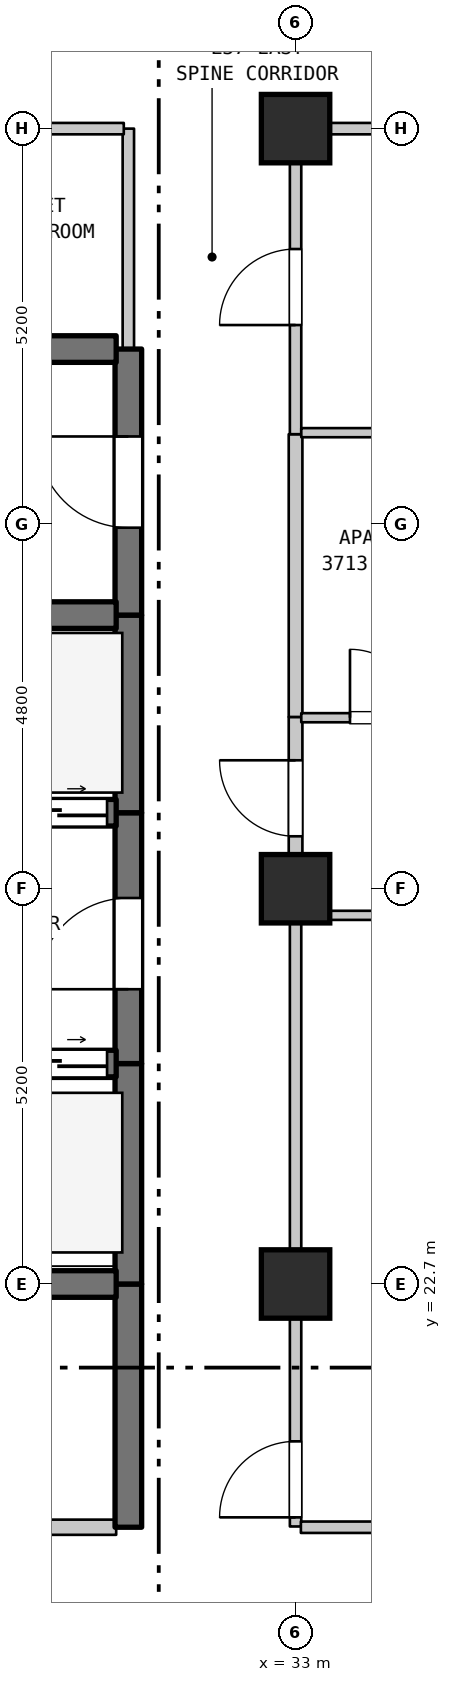
"""IFC4 building model, lengths in metres.
Left out: names, types, materials, properties, quantities, classifications, styles, units other than length and angle.
Written with IfcOpenShell. Run it as: python <this file> out.ifc"""

import sys

from ifc_helpers import new_model, si_unit, direction, frame, frame_2d, origin, origin_2d, place, context, subcontext, project, spatial, rectangle, extrude, element, fill, save


model = new_model("IFC4")
c1 = context("Model", 3, precision=1e-05, world=origin(), true_north=direction((0.0, 1.0)))
c2 = subcontext(c1, "Body", "Model", "MODEL_VIEW")
j1 = project(units=[si_unit("LENGTHUNIT", "METRE"), si_unit("PLANEANGLEUNIT", "RADIAN")], contexts=[c1])
p1 = place(None, origin())
s1 = spatial("IfcSite", under=j1, at=p1, CompositionType="ELEMENT")
p2 = place(p1, origin())
s2 = spatial("IfcBuilding", under=s1, at=p2, CompositionType="ELEMENT")
p3 = place(p2, frame((0.0, 0.0, 152.0)))
s3 = spatial("IfcBuildingStorey", under=s2, at=p3, CompositionType="ELEMENT", Elevation=152.0)
for number, where, z_axis, x_axis in (
    (1, (33.0, 22.7, 0.0), (0.0, 0.0, 1.0), (1.0, 0.0, 0.0)),
    (2, (33.0, 27.9, 0.0), (0.0, 0.0, 1.0), (1.0, 0.0, 0.0)),
    (3, (33.0, 37.9, 0.0), (0.0, 0.0, 1.0), (1.0, 0.0, 0.0)),
):
    element("IfcColumn", number, at=place(p3, frame(where, z_axis=z_axis, x_axis=x_axis)), inside=s3, PredefinedType="COLUMN", context=c2, shape_type="SweptSolid", body=[
        extrude(rectangle(XDim=0.9, YDim=0.9, at=origin_2d()), origin(), (0.0, 0.0, 1.0), 3.7),
    ])
p4 = place(p3, frame((30.8, 19.5, 0.0), z_axis=(0.0, 0.0, 1.0), x_axis=(0.0, 1.0, 0.0)))
e4 = element("IfcWall", 4, at=p4, inside=s3, PredefinedType="SHEAR", context=c2, shape_type="SweptSolid", body=[
    extrude(rectangle(XDim=3.2, YDim=0.35, at=frame_2d((1.6, 0.0))), origin(), (0.0, 0.0, 1.0), 3.385),
])
p5 = place(p3, frame((30.8, 22.7, 0.0), z_axis=(0.0, 0.0, 1.0), x_axis=(0.0, 1.0, 0.0)))
e5 = element("IfcWall", 5, at=p5, inside=s3, PredefinedType="SHEAR", context=c2, shape_type="SweptSolid", body=[
    extrude(rectangle(XDim=2.9, YDim=0.35, at=frame_2d((1.45, 0.0))), origin(), (0.0, 0.0, 1.0), 3.385),
])
p6 = place(p3, frame((30.8, 25.6, 0.0), z_axis=(0.0, 0.0, 1.0), x_axis=(0.0, 1.0, 0.0)))
e6 = element("IfcWall", 6, at=p6, inside=s3, PredefinedType="SHEAR", context=c2, shape_type="SweptSolid", body=[
    extrude(rectangle(XDim=3.3, YDim=0.35, at=frame_2d((1.65, 0.0))), origin(), (0.0, 0.0, 1.0), 3.385),
])
p7 = place(p6, frame((0.978, 0.0, 0.0)))
e7 = element("IfcOpeningElement", 7, at=p7, cuts=e6, PredefinedType="OPENING", context=c2, shape_type="SweptSolid", body=[
    extrude(rectangle(XDim=1.2, YDim=2.2, at=frame_2d((0.6, 1.1))), frame((0.0, 0.185, 0.0), z_axis=(0.0, -1.0, 0.0), x_axis=(1.0, 0.0, 0.0)), (0.0, 0.0, 1.0), 0.37),
])
p8 = place(p3, frame((30.8, 28.9, 0.0), z_axis=(0.0, 0.0, 1.0), x_axis=(0.0, 1.0, 0.0)))
e8 = element("IfcWall", 8, at=p8, inside=s3, PredefinedType="SHEAR", context=c2, shape_type="SweptSolid", body=[
    extrude(rectangle(XDim=2.6, YDim=0.35, at=frame_2d((1.3, 0.0))), origin(), (0.0, 0.0, 1.0), 3.385),
])
p9 = place(p3, frame((30.8, 31.5, 0.0), z_axis=(0.0, 0.0, 1.0), x_axis=(0.0, 1.0, 0.0)))
e9 = element("IfcWall", 9, at=p9, inside=s3, PredefinedType="SHEAR", context=c2, shape_type="SweptSolid", body=[
    extrude(rectangle(XDim=3.5, YDim=0.35, at=frame_2d((1.75, 0.0))), origin(), (0.0, 0.0, 1.0), 3.385),
])
p10 = place(p9, frame((1.15, 0.0, 0.0)))
e10 = element("IfcOpeningElement", 10, at=p10, cuts=e9, PredefinedType="OPENING", context=c2, shape_type="SweptSolid", body=[
    extrude(rectangle(XDim=1.2, YDim=2.2, at=frame_2d((0.6, 1.1))), frame((0.0, 0.185, 0.0), z_axis=(0.0, -1.0, 0.0), x_axis=(1.0, 0.0, 0.0)), (0.0, 0.0, 1.0), 0.37),
])
p11 = place(p3, frame((30.8, 35.0, 0.0), z_axis=(0.0, 0.0, 1.0), x_axis=(0.0, 1.0, 0.0)))
e11 = element("IfcWall", 11, at=p11, inside=s3, PredefinedType="STANDARD", context=c2, shape_type="SweptSolid", body=[
    extrude(rectangle(XDim=2.9, YDim=0.15, at=frame_2d((1.45, 0.0))), origin(), (0.0, 0.0, 1.0), 3.385),
])
p12 = place(p3, frame((33.0, 19.51, 0.0), z_axis=(0.0, 0.0, 1.0), x_axis=(0.0, 1.0, 0.0)))
e12 = element("IfcWall", 12, at=p12, inside=s3, PredefinedType="STANDARD", context=c2, shape_type="SweptSolid", body=[
    extrude(rectangle(XDim=8.04, YDim=0.15, at=frame_2d((4.02, 0.0))), origin(), (0.0, 0.0, 1.0), 2.935),
])
p13 = place(p12, frame((0.12, 0.0, 0.0)))
e13 = element("IfcOpeningElement", 13, at=p13, cuts=e12, PredefinedType="OPENING", context=c2, shape_type="SweptSolid", body=[
    extrude(rectangle(XDim=1.0, YDim=2.15, at=frame_2d((0.5, 1.075))), frame((0.0, 0.085, 0.0), z_axis=(0.0, -1.0, 0.0), x_axis=(1.0, 0.0, 0.0)), (0.0, 0.0, 1.0), 0.17),
])
p14 = place(p3, frame((33.0, 27.56, 0.0), z_axis=(0.0, 0.0, 1.0), x_axis=(0.0, 1.0, 0.0)))
e14 = element("IfcWall", 14, at=p14, inside=s3, PredefinedType="STANDARD", context=c2, shape_type="SweptSolid", body=[
    extrude(rectangle(XDim=2.6, YDim=0.18, at=frame_2d((1.3, 0.0))), origin(), (0.0, 0.0, 1.0), 2.885),
])
p15 = place(p14, frame((1.03, 0.0, 0.0)))
e15 = element("IfcOpeningElement", 15, at=p15, cuts=e14, PredefinedType="OPENING", context=c2, shape_type="SweptSolid", body=[
    extrude(rectangle(XDim=1.0, YDim=2.15, at=frame_2d((0.5, 1.075))), frame((0.0, 0.1, 0.0), z_axis=(0.0, -1.0, 0.0), x_axis=(1.0, 0.0, 0.0)), (0.0, 0.0, 1.0), 0.2),
])
p16 = place(p3, frame((33.0, 30.16, 0.0), z_axis=(0.0, 0.0, 1.0), x_axis=(0.0, 1.0, 0.0)))
e16 = element("IfcWall", 16, at=p16, inside=s3, PredefinedType="STANDARD", context=c2, shape_type="SweptSolid", body=[
    extrude(rectangle(XDim=3.72, YDim=0.18, at=frame_2d((1.86, 0.0))), origin(), (0.0, 0.0, 1.0), 2.885),
])
p17 = place(p3, frame((33.0, 33.88, 0.0), z_axis=(0.0, 0.0, 1.0), x_axis=(0.0, 1.0, 0.0)))
e17 = element("IfcWall", 17, at=p17, inside=s3, PredefinedType="STANDARD", context=c2, shape_type="SweptSolid", body=[
    extrude(rectangle(XDim=4.02, YDim=0.15, at=frame_2d((2.01, 0.0))), origin(), (0.0, 0.0, 1.0), 2.885),
])
p18 = place(p17, frame((1.436, 0.0, 0.0)))
e18 = element("IfcOpeningElement", 18, at=p18, cuts=e17, PredefinedType="OPENING", context=c2, shape_type="SweptSolid", body=[
    extrude(rectangle(XDim=1.0, YDim=2.15, at=frame_2d((0.5, 1.075))), frame((0.0, 0.085, 0.0), z_axis=(0.0, -1.0, 0.0), x_axis=(1.0, 0.0, 0.0)), (0.0, 0.0, 1.0), 0.17),
])
p19 = place(p3, frame((25.985, 19.5, 0.0), z_axis=(0.0, 0.0, 1.0), x_axis=(1.0, 0.0, 0.0)))
e19 = element("IfcWall", 19, at=p19, inside=s3, PredefinedType="STANDARD", context=c2, shape_type="SweptSolid", body=[
    extrude(rectangle(XDim=4.655, YDim=0.2, at=frame_2d((2.327, 0.0))), origin(), (0.0, 0.0, 1.0), 3.385),
])
p20 = place(p19, frame((1.845, 0.0, 0.0)))
e20 = element("IfcOpeningElement", 20, at=p20, cuts=e19, PredefinedType="OPENING", context=c2, shape_type="SweptSolid", body=[
    extrude(rectangle(XDim=0.9, YDim=2.15, at=frame_2d((0.45, 1.075))), frame((0.0, 0.11, 0.0), z_axis=(0.0, -1.0, 0.0), x_axis=(1.0, 0.0, 0.0)), (0.0, 0.0, 1.0), 0.22),
])
p21 = place(p3, frame((33.07, 19.5, 0.0), z_axis=(0.0, 0.0, 1.0), x_axis=(1.0, 0.0, 0.0)))
e21 = element("IfcWall", 21, at=p21, inside=s3, PredefinedType="STANDARD", context=c2, shape_type="SweptSolid", body=[
    extrude(rectangle(XDim=21.51, YDim=0.15, at=frame_2d((10.755, 0.0))), origin(), (0.0, 0.0, 1.0), 3.385),
])
p22 = place(p21, frame((10.185, 0.0, 0.0)))
e22 = element("IfcOpeningElement", 22, at=p22, cuts=e21, PredefinedType="OPENING", context=c2, shape_type="SweptSolid", body=[
    extrude(rectangle(XDim=1.0, YDim=2.15, at=frame_2d((0.5, 1.075))), frame((0.0, 0.085, 0.0), z_axis=(0.0, -1.0, 0.0), x_axis=(1.0, 0.0, 0.0)), (0.0, 0.0, 1.0), 0.17),
])
p23 = place(p3, frame((27.46, 22.7, 0.0), z_axis=(0.0, 0.0, 1.0), x_axis=(1.0, 0.0, 0.0)))
e23 = element("IfcWall", 23, at=p23, inside=s3, PredefinedType="SHEAR", context=c2, shape_type="SweptSolid", body=[
    extrude(rectangle(XDim=3.18, YDim=0.35, at=frame_2d((1.59, 0.0))), origin(), (0.0, 0.0, 1.0), 3.385),
])
p24 = place(p3, frame((27.46, 25.6, 0.0), z_axis=(0.0, 0.0, 1.0), x_axis=(1.0, 0.0, 0.0)))
e24 = element("IfcWall", 24, at=p24, inside=s3, PredefinedType="SHEAR", context=c2, shape_type="SweptSolid", body=[
    extrude(rectangle(XDim=3.18, YDim=0.35, at=frame_2d((1.59, 0.0))), origin(), (0.0, 0.0, 1.0), 3.385),
])
p25 = place(p24, frame((0.12, 0.0, 0.0)))
e25 = element("IfcOpeningElement", 25, at=p25, cuts=e24, PredefinedType="OPENING", context=c2, shape_type="SweptSolid", body=[
    extrude(rectangle(XDim=1.25, YDim=2.2, at=frame_2d((0.625, 1.1))), frame((0.0, 0.185, 0.0), z_axis=(0.0, -1.0, 0.0), x_axis=(1.0, 0.0, 0.0)), (0.0, 0.0, 1.0), 0.37),
])
p26 = place(p24, frame((1.81, 0.0, 0.0)))
e26 = element("IfcOpeningElement", 26, at=p26, cuts=e24, PredefinedType="OPENING", context=c2, shape_type="SweptSolid", body=[
    extrude(rectangle(XDim=1.25, YDim=2.2, at=frame_2d((0.625, 1.1))), frame((0.0, 0.185, 0.0), z_axis=(0.0, -1.0, 0.0), x_axis=(1.0, 0.0, 0.0)), (0.0, 0.0, 1.0), 0.37),
])
p27 = place(p3, frame((33.085, 27.55, 0.0), z_axis=(0.0, 0.0, 1.0), x_axis=(1.0, 0.0, 0.0)))
e27 = element("IfcWall", 27, at=p27, inside=s3, PredefinedType="PARTITIONING", context=c2, shape_type="SweptSolid", body=[
    extrude(rectangle(XDim=23.905, YDim=0.12, at=frame_2d((11.953, 0.0))), origin(), (0.0, 0.0, 1.0), 3.385),
])
p28 = place(p3, frame((27.46, 28.9, 0.0), z_axis=(0.0, 0.0, 1.0), x_axis=(1.0, 0.0, 0.0)))
e28 = element("IfcWall", 28, at=p28, inside=s3, PredefinedType="SHEAR", context=c2, shape_type="SweptSolid", body=[
    extrude(rectangle(XDim=3.18, YDim=0.35, at=frame_2d((1.59, 0.0))), origin(), (0.0, 0.0, 1.0), 3.385),
])
p29 = place(p28, frame((0.12, 0.0, 0.0)))
e29 = element("IfcOpeningElement", 29, at=p29, cuts=e28, PredefinedType="OPENING", context=c2, shape_type="SweptSolid", body=[
    extrude(rectangle(XDim=1.25, YDim=2.2, at=frame_2d((0.625, 1.1))), frame((0.0, 0.185, 0.0), z_axis=(0.0, -1.0, 0.0), x_axis=(1.0, 0.0, 0.0)), (0.0, 0.0, 1.0), 0.37),
])
p30 = place(p28, frame((1.81, 0.0, 0.0)))
e30 = element("IfcOpeningElement", 30, at=p30, cuts=e28, PredefinedType="OPENING", context=c2, shape_type="SweptSolid", body=[
    extrude(rectangle(XDim=1.25, YDim=2.2, at=frame_2d((0.625, 1.1))), frame((0.0, 0.185, 0.0), z_axis=(0.0, -1.0, 0.0), x_axis=(1.0, 0.0, 0.0)), (0.0, 0.0, 1.0), 0.37),
])
p31 = place(p3, frame((33.075, 30.15, 0.0), z_axis=(0.0, 0.0, 1.0), x_axis=(1.0, 0.0, 0.0)))
e31 = element("IfcWall", 31, at=p31, inside=s3, PredefinedType="PARTITIONING", context=c2, shape_type="SweptSolid", body=[
    extrude(rectangle(XDim=2.364, YDim=0.12, at=frame_2d((1.182, 0.0))), origin(), (0.0, 0.0, 1.0), 3.385),
])
p32 = place(p31, frame((0.641, 0.0, 0.0)))
e32 = element("IfcOpeningElement", 32, at=p32, cuts=e31, PredefinedType="OPENING", context=c2, shape_type="SweptSolid", body=[
    extrude(rectangle(XDim=0.9, YDim=2.15, at=frame_2d((0.45, 1.075))), frame((0.0, 0.07, 0.0), z_axis=(0.0, -1.0, 0.0), x_axis=(1.0, 0.0, 0.0)), (0.0, 0.0, 1.0), 0.14),
])
p33 = place(p3, frame((27.46, 31.5, 0.0), z_axis=(0.0, 0.0, 1.0), x_axis=(1.0, 0.0, 0.0)))
e33 = element("IfcWall", 33, at=p33, inside=s3, PredefinedType="SHEAR", context=c2, shape_type="SweptSolid", body=[
    extrude(rectangle(XDim=3.18, YDim=0.35, at=frame_2d((1.59, 0.0))), origin(), (0.0, 0.0, 1.0), 3.385),
])
p34 = place(p3, frame((33.075, 33.9, 0.0), z_axis=(0.0, 0.0, 1.0), x_axis=(1.0, 0.0, 0.0)))
e34 = element("IfcWall", 34, at=p34, inside=s3, PredefinedType="PARTITIONING", context=c2, shape_type="SweptSolid", body=[
    extrude(rectangle(XDim=2.364, YDim=0.12, at=frame_2d((1.182, 0.0))), origin(), (0.0, 0.0, 1.0), 3.385),
])
p35 = place(p3, frame((26.645, 35.0, 0.0), z_axis=(0.0, 0.0, 1.0), x_axis=(1.0, 0.0, 0.0)))
e35 = element("IfcWall", 35, at=p35, inside=s3, PredefinedType="SHEAR", context=c2, shape_type="SweptSolid", body=[
    extrude(rectangle(XDim=3.995, YDim=0.35, at=frame_2d((1.998, 0.0))), origin(), (0.0, 0.0, 1.0), 3.385),
])
p36 = place(p35, frame((1.508, 0.0, 0.0)))
e36 = element("IfcOpeningElement", 36, at=p36, cuts=e35, PredefinedType="OPENING", context=c2, shape_type="SweptSolid", body=[
    extrude(rectangle(XDim=0.95, YDim=2.15, at=frame_2d((0.475, 1.075))), frame((0.0, 0.185, 0.0), z_axis=(0.0, -1.0, 0.0), x_axis=(1.0, 0.0, 0.0)), (0.0, 0.0, 1.0), 0.37),
])
p37 = place(p3, frame((26.645, 37.9, 0.0), z_axis=(0.0, 0.0, 1.0), x_axis=(1.0, 0.0, 0.0)))
e37 = element("IfcWall", 37, at=p37, inside=s3, PredefinedType="STANDARD", context=c2, shape_type="SweptSolid", body=[
    extrude(rectangle(XDim=4.095, YDim=0.15, at=frame_2d((2.047, 0.0))), origin(), (0.0, 0.0, 1.0), 2.885),
])
p38 = place(p3, frame((33.06, 37.9, 0.0), z_axis=(0.0, 0.0, 1.0), x_axis=(1.0, 0.0, 0.0)))
e38 = element("IfcWall", 38, at=p38, inside=s3, PredefinedType="STANDARD", context=c2, shape_type="SweptSolid", body=[
    extrude(rectangle(XDim=11.879, YDim=0.15, at=frame_2d((5.939, 0.0))), origin(), (0.0, 0.0, 1.0), 3.385),
])
p39 = place(p38, frame((5.439, 0.0, 0.0)))
e39 = element("IfcOpeningElement", 39, at=p39, cuts=e38, PredefinedType="OPENING", context=c2, shape_type="SweptSolid", body=[
    extrude(rectangle(XDim=1.0, YDim=2.15, at=frame_2d((0.5, 1.075))), frame((0.0, 0.085, 0.0), z_axis=(0.0, -1.0, 0.0), x_axis=(1.0, 0.0, 0.0)), (0.0, 0.0, 1.0), 0.17),
])
p40 = place(p7, origin())
e40 = element("IfcDoor", 40, at=p40, inside=s3, OperationType="SINGLE_SWING_LEFT", PredefinedType="DOOR", context=c2, shape_type="SweptSolid", body=[
    extrude(rectangle(XDim=1.2, YDim=2.2, at=frame_2d((0.6, 1.1))), frame((0.0, 0.025, 0.0), z_axis=(0.0, -1.0, 0.0), x_axis=(1.0, 0.0, 0.0)), (0.0, 0.0, 1.0), 0.05),
])
fill(e7, e40)
p41 = place(p10, origin())
e41 = element("IfcDoor", 41, at=p41, inside=s3, OperationType="SINGLE_SWING_RIGHT", PredefinedType="DOOR", context=c2, shape_type="SweptSolid", body=[
    extrude(rectangle(XDim=1.2, YDim=2.2, at=frame_2d((0.6, 1.1))), frame((0.0, 0.025, 0.0), z_axis=(0.0, -1.0, 0.0), x_axis=(1.0, 0.0, 0.0)), (0.0, 0.0, 1.0), 0.05),
])
fill(e10, e41)
p42 = place(p13, origin())
e42 = element("IfcDoor", 42, at=p42, inside=s3, OperationType="SINGLE_SWING_LEFT", PredefinedType="DOOR", context=c2, shape_type="SweptSolid", body=[
    extrude(rectangle(XDim=1.0, YDim=2.15, at=frame_2d((0.5, 1.075))), frame((0.0, 0.025, 0.0), z_axis=(0.0, -1.0, 0.0), x_axis=(1.0, 0.0, 0.0)), (0.0, 0.0, 1.0), 0.05),
])
fill(e13, e42)
p43 = place(p15, origin())
e43 = element("IfcDoor", 43, at=p43, inside=s3, OperationType="SINGLE_SWING_RIGHT", PredefinedType="DOOR", context=c2, shape_type="SweptSolid", body=[
    extrude(rectangle(XDim=1.0, YDim=2.15, at=frame_2d((0.5, 1.075))), frame((0.0, 0.025, 0.0), z_axis=(0.0, -1.0, 0.0), x_axis=(1.0, 0.0, 0.0)), (0.0, 0.0, 1.0), 0.05),
])
fill(e15, e43)
p44 = place(p18, origin())
e44 = element("IfcDoor", 44, at=p44, inside=s3, OperationType="SINGLE_SWING_LEFT", PredefinedType="DOOR", context=c2, shape_type="SweptSolid", body=[
    extrude(rectangle(XDim=1.0, YDim=2.15, at=frame_2d((0.5, 1.075))), frame((0.0, 0.025, 0.0), z_axis=(0.0, -1.0, 0.0), x_axis=(1.0, 0.0, 0.0)), (0.0, 0.0, 1.0), 0.05),
])
fill(e18, e44)
p45 = place(p26, origin())
e45 = element("IfcDoor", 45, at=p45, inside=s3, OperationType="DOUBLE_DOOR_SLIDING", PredefinedType="DOOR", context=c2, shape_type="SweptSolid", body=[
    extrude(rectangle(XDim=1.25, YDim=2.2, at=frame_2d((0.625, 1.1))), frame((0.0, 0.025, 0.0), z_axis=(0.0, -1.0, 0.0), x_axis=(1.0, 0.0, 0.0)), (0.0, 0.0, 1.0), 0.05),
])
fill(e26, e45)
p46 = place(p30, origin())
e46 = element("IfcDoor", 46, at=p46, inside=s3, OperationType="DOUBLE_DOOR_SLIDING", PredefinedType="DOOR", context=c2, shape_type="SweptSolid", body=[
    extrude(rectangle(XDim=1.25, YDim=2.2, at=frame_2d((0.625, 1.1))), frame((0.0, 0.025, 0.0), z_axis=(0.0, -1.0, 0.0), x_axis=(1.0, 0.0, 0.0)), (0.0, 0.0, 1.0), 0.05),
])
fill(e30, e46)
p47 = place(p32, origin())
e47 = element("IfcDoor", 47, at=p47, inside=s3, OperationType="SINGLE_SWING_LEFT", PredefinedType="DOOR", context=c2, shape_type="SweptSolid", body=[
    extrude(rectangle(XDim=0.9, YDim=2.15, at=frame_2d((0.45, 1.075))), frame((0.0, 0.025, 0.0), z_axis=(0.0, -1.0, 0.0), x_axis=(1.0, 0.0, 0.0)), (0.0, 0.0, 1.0), 0.05),
])
fill(e32, e47)
save(model, sys.argv[1])
